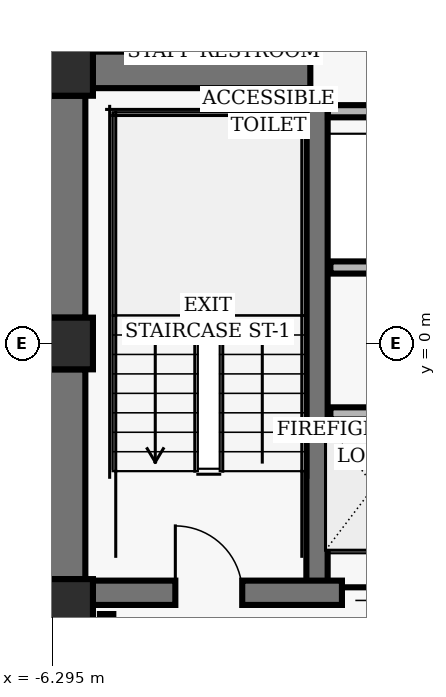
"""IFC4 building model, lengths in metres.
Left out: names, types, materials, properties, quantities, classifications, styles, units other than length and angle.
Written with IfcOpenShell. Run it as: python <this file> out.ifc"""

import sys

from ifc_helpers import new_model, si_unit, direction, frame, frame_2d, origin, origin_2d, place, context, subcontext, project, spatial, rectangle, hollow_rectangle, extrude, element, fill, save


model = new_model("IFC4")
c1 = context("Model", 3, precision=1e-05, world=origin(), true_north=direction((0.0, 1.0)))
c2 = subcontext(c1, "Body", "Model", "MODEL_VIEW")
j1 = project(units=[si_unit("LENGTHUNIT", "METRE"), si_unit("PLANEANGLEUNIT", "RADIAN")], contexts=[c1])
p1 = place(None, origin())
s1 = spatial("IfcSite", under=j1, at=p1, CompositionType="ELEMENT")
p2 = place(p1, origin())
s2 = spatial("IfcBuilding", under=s1, at=p2, CompositionType="ELEMENT")
p3 = place(p2, frame((0.0, 0.0, 125.92)))
s3 = spatial("IfcBuildingStorey", under=s2, at=p3, CompositionType="ELEMENT", Elevation=125.92)
for number, where, z_axis, x_axis in (
    (1, (-6.05, 4.5, 0.0), (0.0, 0.0, 1.0), (1.0, 0.0, 0.0)),
    (2, (-6.05, 0.0, 0.0), (0.0, 0.0, 1.0), (1.0, 0.0, 0.0)),
    (3, (-6.05, -4.3, 0.0), (0.0, 0.0, 1.0), (1.0, 0.0, 0.0)),
):
    element("IfcColumn", number, at=place(p3, frame(where, z_axis=z_axis, x_axis=x_axis)), inside=s3, PredefinedType="COLUMN", context=c2, shape_type="SweptSolid", body=[
        extrude(hollow_rectangle(XDim=0.85, YDim=0.85, WallThickness=0.055, InnerFilletRadius=0.02, OuterFilletRadius=0.04, at=origin_2d()), origin(), (0.0, 0.0, 1.0), 3.04),
    ])
p4 = place(p3, frame((-6.05, 0.425, 0.0), z_axis=(0.0, 0.0, 1.0), x_axis=(0.0, 1.0, 0.0)))
e4 = element("IfcWall", 4, at=p4, inside=s3, PredefinedType="SHEAR", context=c2, shape_type="SweptSolid", body=[
    extrude(rectangle(XDim=3.65, YDim=0.6, at=frame_2d((1.825, 0.0))), origin(), (0.0, 0.0, 1.0), 2.788),
])
p5 = place(p3, frame((-6.05, -3.875, 0.0), z_axis=(0.0, 0.0, 1.0), x_axis=(0.0, 1.0, 0.0)))
e5 = element("IfcWall", 5, at=p5, inside=s3, PredefinedType="SHEAR", context=c2, shape_type="SweptSolid", body=[
    extrude(rectangle(XDim=3.45, YDim=0.6, at=frame_2d((1.725, 0.0))), origin(), (0.0, 0.0, 1.0), 2.788),
])
p6 = place(p3, frame((-1.94, -4.1, 0.0), z_axis=(0.0, 0.0, 1.0), x_axis=(0.0, 1.0, 0.0)))
e6 = element("IfcWall", 6, at=p6, inside=s3, PredefinedType="SHEAR", context=c2, shape_type="SweptSolid", body=[
    extrude(rectangle(XDim=8.2, YDim=0.35, at=frame_2d((4.1, 0.0))), origin(), (0.0, 0.0, 1.0), 2.788),
])
p7 = place(p3, frame((-5.625, -4.1, 0.0), z_axis=(0.0, 0.0, 1.0), x_axis=(1.0, 0.0, 0.0)))
e7 = element("IfcWall", 7, at=p7, inside=s3, PredefinedType="SHEAR", context=c2, shape_type="SweptSolid", body=[
    extrude(rectangle(XDim=11.25, YDim=0.4, at=frame_2d((5.625, 0.0))), origin(), (0.0, 0.0, 1.0), 2.788),
])
p8 = place(p7, frame((1.355, 0.0, 0.0)))
e8 = element("IfcOpeningElement", 8, at=p8, cuts=e7, PredefinedType="OPENING", context=c2, shape_type="SweptSolid", body=[
    extrude(rectangle(XDim=1.1, YDim=2.04, at=frame_2d((0.55, 1.02))), frame((0.0, 0.21, 0.0), z_axis=(0.0, -1.0, 0.0), x_axis=(1.0, 0.0, 0.0)), (0.0, 0.0, 1.0), 0.42),
])
p9 = place(p7, frame((8.795, 0.0, 0.0)))
e9 = element("IfcOpeningElement", 9, at=p9, cuts=e7, PredefinedType="OPENING", context=c2, shape_type="SweptSolid", body=[
    extrude(rectangle(XDim=1.1, YDim=2.04, at=frame_2d((0.55, 1.02))), frame((0.0, 0.21, 0.0), z_axis=(0.0, -1.0, 0.0), x_axis=(1.0, 0.0, 0.0)), (0.0, 0.0, 1.0), 0.42),
])
p10 = place(p7, frame((4.095, 0.0, 0.0)))
e10 = element("IfcOpeningElement", 10, at=p10, cuts=e7, PredefinedType="OPENING", context=c2, shape_type="SweptSolid", body=[
    extrude(rectangle(XDim=1.06, YDim=2.04, at=frame_2d((0.53, 1.02))), frame((0.0, 0.21, 0.0), z_axis=(0.0, -1.0, 0.0), x_axis=(1.0, 0.0, 0.0)), (0.0, 0.0, 1.0), 0.42),
])
p11 = place(p7, frame((6.095, 0.0, 0.0)))
e11 = element("IfcOpeningElement", 11, at=p11, cuts=e7, PredefinedType="OPENING", context=c2, shape_type="SweptSolid", body=[
    extrude(rectangle(XDim=1.06, YDim=2.04, at=frame_2d((0.53, 1.02))), frame((0.0, 0.21, 0.0), z_axis=(0.0, -1.0, 0.0), x_axis=(1.0, 0.0, 0.0)), (0.0, 0.0, 1.0), 0.42),
])
p12 = place(p3, frame((-5.625, 4.5, 0.0), z_axis=(0.0, 0.0, 1.0), x_axis=(1.0, 0.0, 0.0)))
e12 = element("IfcWall", 12, at=p12, inside=s3, PredefinedType="SHEAR", context=c2, shape_type="SweptSolid", body=[
    extrude(rectangle(XDim=3.575, YDim=0.6, at=frame_2d((1.788, 0.0))), origin(), (0.0, 0.0, 1.0), 2.788),
])
p13 = place(p3, frame((-1.72, -1.15, 0.0), z_axis=(0.0, 0.0, 1.0), x_axis=(1.0, 0.0, 0.0)))
e13 = element("IfcWall", 13, at=p13, inside=s3, PredefinedType="PARTITIONING", context=c2, shape_type="SweptSolid", body=[
    extrude(rectangle(XDim=3.44, YDim=0.2, at=frame_2d((1.72, 0.0))), origin(), (0.0, 0.0, 1.0), 2.763),
])
p14 = place(p3, frame((-5.4, -7.16, 0.0), z_axis=(0.0, 0.0, 1.0), x_axis=(0.0, 1.0, 0.0)))
e14 = element("IfcWall", 14, at=p14, inside=s3, PredefinedType="PARTITIONING", context=c2, shape_type="SweptSolid", body=[
    extrude(rectangle(XDim=2.71, YDim=0.22, at=frame_2d((1.355, 0.0))), origin(), (0.0, 0.0, 1.0), 2.763),
])
p15 = place(p3, frame((-1.72, 1.25, 0.0), z_axis=(0.0, 0.0, 1.0), x_axis=(1.0, 0.0, 0.0)))
e15 = element("IfcWall", 15, at=p15, inside=s3, PredefinedType="PARTITIONING", context=c2, shape_type="SweptSolid", body=[
    extrude(rectangle(XDim=3.44, YDim=0.2, at=frame_2d((1.72, 0.0))), origin(), (0.0, 0.0, 1.0), 2.763),
])
p16 = place(p3, frame((-1.76, 3.82, 0.0), z_axis=(0.0, 0.0, 1.0), x_axis=(1.0, 0.0, 0.0)))
e16 = element("IfcWall", 16, at=p16, inside=s3, PredefinedType="PARTITIONING", context=c2, shape_type="SweptSolid", body=[
    extrude(rectangle(XDim=3.52, YDim=0.2, at=frame_2d((1.76, 0.0))), origin(), (0.0, 0.0, 1.0), 2.763),
])
p17 = place(p8, origin())
e17 = element("IfcDoor", 17, at=p17, inside=s3, OperationType="SINGLE_SWING_LEFT", PredefinedType="DOOR", context=c2, shape_type="SweptSolid", body=[
    extrude(rectangle(XDim=1.1, YDim=2.04, at=frame_2d((0.55, 1.02))), frame((0.0, 0.025, 0.0), z_axis=(0.0, -1.0, 0.0), x_axis=(1.0, 0.0, 0.0)), (0.0, 0.0, 1.0), 0.05),
])
fill(e8, e17)
p18 = place(p10, origin())
e18 = element("IfcDoor", 18, at=p18, inside=s3, OperationType="SLIDING_TO_LEFT", PredefinedType="DOOR", context=c2, shape_type="SweptSolid", body=[
    extrude(rectangle(XDim=1.06, YDim=2.04, at=frame_2d((0.53, 1.02))), frame((0.0, 0.025, 0.0), z_axis=(0.0, -1.0, 0.0), x_axis=(1.0, 0.0, 0.0)), (0.0, 0.0, 1.0), 0.05),
])
fill(e10, e18)
save(model, sys.argv[1])
